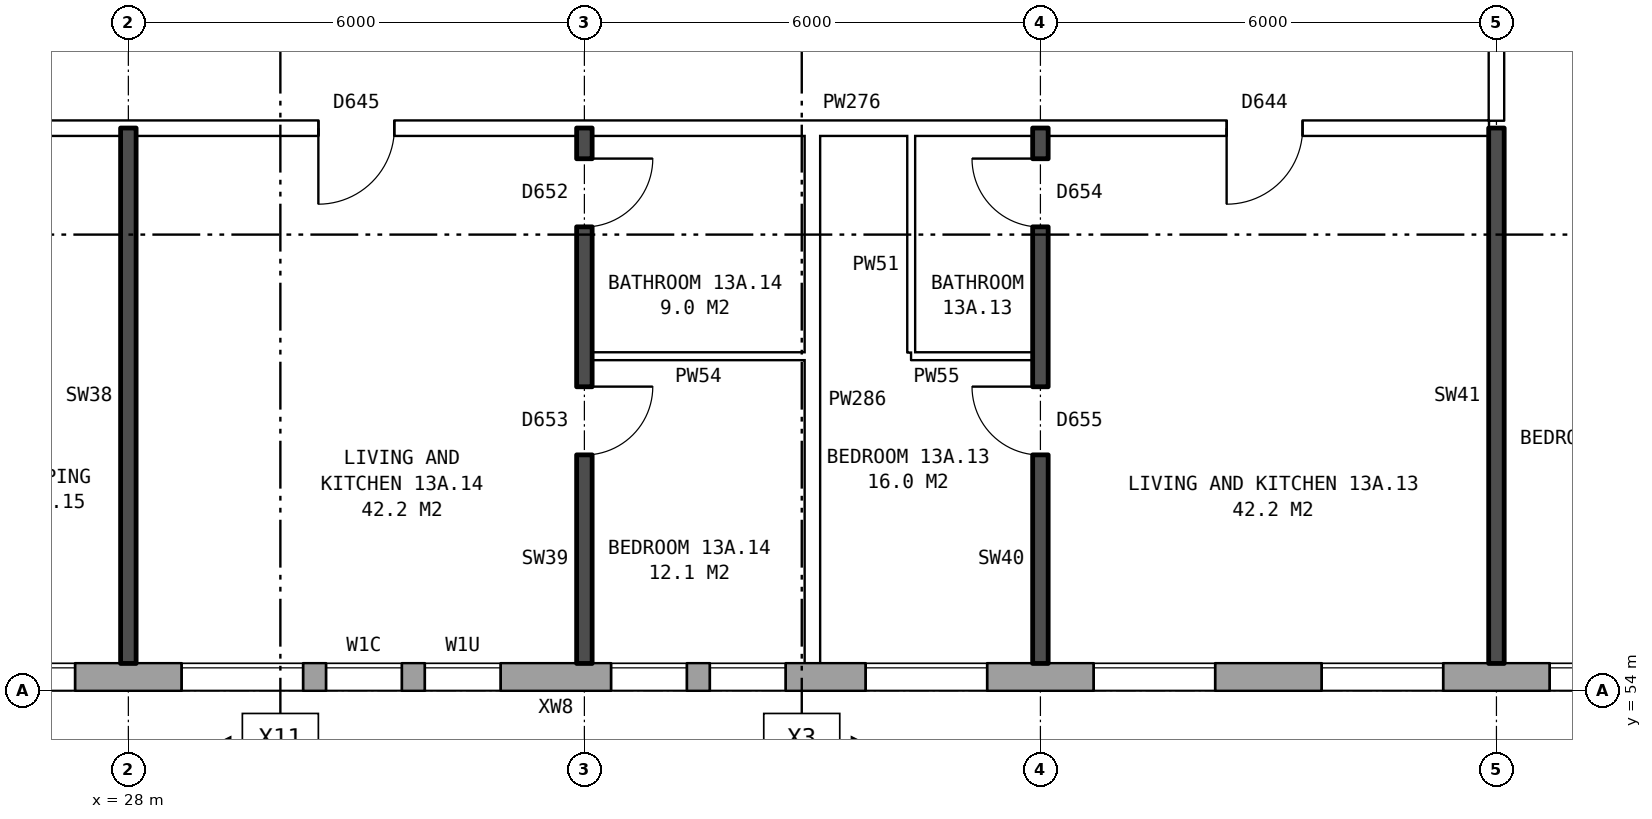
"""IFC4 building model, lengths in metres.
Left out: names, types, materials, properties, quantities, classifications, styles, units other than length and angle.
Written with IfcOpenShell. Run it as: python <this file> out.ifc"""

import sys

from ifc_helpers import new_model, si_unit, direction, frame, frame_2d, origin, place, context, subcontext, project, spatial, rectangle, extrude, element, fill, save


model = new_model("IFC4")
c1 = context("Model", 3, precision=1e-05, world=origin(), true_north=direction((0.0, 1.0)))
c2 = subcontext(c1, "Body", "Model", "MODEL_VIEW")
j1 = project(units=[si_unit("LENGTHUNIT", "METRE"), si_unit("PLANEANGLEUNIT", "RADIAN")], contexts=[c1])
p1 = place(None, origin())
s1 = spatial("IfcSite", under=j1, at=p1, CompositionType="ELEMENT")
p2 = place(p1, origin())
s2 = spatial("IfcBuilding", under=s1, at=p2, CompositionType="ELEMENT")
p3 = place(p2, frame((0.0, 0.0, 50.5)))
s3 = spatial("IfcBuildingStorey", under=s2, at=p3, CompositionType="ELEMENT", Elevation=50.5)
p4 = place(p3, frame((24.575, 54.18, 0.0), z_axis=(0.0, 0.0, 1.0), x_axis=(1.0, 0.0, 0.0)))
e1 = element("IfcWall", 1, at=p4, inside=s3, PredefinedType="STANDARD", context=c2, shape_type="SweptSolid", body=[
    extrude(rectangle(XDim=48.351, YDim=0.36, at=frame_2d((24.175, 0.0))), origin(), (0.0, 0.0, 1.0), 2.85),
])
p5 = place(p4, frame((1.125, 0.0, 0.8)))
e2 = element("IfcOpeningElement", 2, at=p5, cuts=e1, PredefinedType="OPENING", context=c2, shape_type="SweptSolid", body=[
    extrude(rectangle(XDim=1.6, YDim=1.8, at=frame_2d((0.8, 0.9))), frame((0.0, 0.19, 0.0), z_axis=(0.0, -1.0, 0.0), x_axis=(1.0, 0.0, 0.0)), (0.0, 0.0, 1.0), 0.38),
])
p6 = place(p4, frame((4.125, 0.0, 0.8)))
e3 = element("IfcOpeningElement", 3, at=p6, cuts=e1, PredefinedType="OPENING", context=c2, shape_type="SweptSolid", body=[
    extrude(rectangle(XDim=1.6, YDim=1.8, at=frame_2d((0.8, 0.9))), frame((0.0, 0.19, 0.0), z_axis=(0.0, -1.0, 0.0), x_axis=(1.0, 0.0, 0.0)), (0.0, 0.0, 1.0), 0.38),
])
p7 = place(p4, frame((6.025, 0.0, 0.8)))
e4 = element("IfcOpeningElement", 4, at=p7, cuts=e1, PredefinedType="OPENING", context=c2, shape_type="SweptSolid", body=[
    extrude(rectangle(XDim=1.0, YDim=1.8, at=frame_2d((0.5, 0.9))), frame((0.0, 0.19, 0.0), z_axis=(0.0, -1.0, 0.0), x_axis=(1.0, 0.0, 0.0)), (0.0, 0.0, 1.0), 0.38),
])
p8 = place(p4, frame((9.775, 0.0, 0.8)))
e5 = element("IfcOpeningElement", 5, at=p8, cuts=e1, PredefinedType="OPENING", context=c2, shape_type="SweptSolid", body=[
    extrude(rectangle(XDim=1.0, YDim=0.9, at=frame_2d((0.5, 0.45))), frame((0.0, 0.19, 0.0), z_axis=(0.0, -1.0, 0.0), x_axis=(1.0, 0.0, 0.0)), (0.0, 0.0, 1.0), 0.38),
])
p9 = place(p4, frame((13.125, 0.0, 0.8)))
e6 = element("IfcOpeningElement", 6, at=p9, cuts=e1, PredefinedType="OPENING", context=c2, shape_type="SweptSolid", body=[
    extrude(rectangle(XDim=1.6, YDim=1.8, at=frame_2d((0.8, 0.9))), frame((0.0, 0.19, 0.0), z_axis=(0.0, -1.0, 0.0), x_axis=(1.0, 0.0, 0.0)), (0.0, 0.0, 1.0), 0.38),
])
p10 = place(p4, frame((16.125, 0.0, 0.8)))
e7 = element("IfcOpeningElement", 7, at=p10, cuts=e1, PredefinedType="OPENING", context=c2, shape_type="SweptSolid", body=[
    extrude(rectangle(XDim=1.6, YDim=1.8, at=frame_2d((0.8, 0.9))), frame((0.0, 0.19, 0.0), z_axis=(0.0, -1.0, 0.0), x_axis=(1.0, 0.0, 0.0)), (0.0, 0.0, 1.0), 0.38),
])
p11 = place(p4, frame((19.125, 0.0, 0.8)))
e8 = element("IfcOpeningElement", 8, at=p11, cuts=e1, PredefinedType="OPENING", context=c2, shape_type="SweptSolid", body=[
    extrude(rectangle(XDim=1.6, YDim=1.8, at=frame_2d((0.8, 0.9))), frame((0.0, 0.19, 0.0), z_axis=(0.0, -1.0, 0.0), x_axis=(1.0, 0.0, 0.0)), (0.0, 0.0, 1.0), 0.38),
])
p12 = place(p4, frame((22.125, 0.0, 0.8)))
e9 = element("IfcOpeningElement", 9, at=p12, cuts=e1, PredefinedType="OPENING", context=c2, shape_type="SweptSolid", body=[
    extrude(rectangle(XDim=1.6, YDim=1.8, at=frame_2d((0.8, 0.9))), frame((0.0, 0.19, 0.0), z_axis=(0.0, -1.0, 0.0), x_axis=(1.0, 0.0, 0.0)), (0.0, 0.0, 1.0), 0.38),
])
p13 = place(p4, frame((25.125, 0.0, 0.8)))
e10 = element("IfcOpeningElement", 10, at=p13, cuts=e1, PredefinedType="OPENING", context=c2, shape_type="SweptSolid", body=[
    extrude(rectangle(XDim=1.6, YDim=1.8, at=frame_2d((0.8, 0.9))), frame((0.0, 0.19, 0.0), z_axis=(0.0, -1.0, 0.0), x_axis=(1.0, 0.0, 0.0)), (0.0, 0.0, 1.0), 0.38),
])
p14 = place(p4, frame((28.125, 0.0, 0.8)))
e11 = element("IfcOpeningElement", 11, at=p14, cuts=e1, PredefinedType="OPENING", context=c2, shape_type="SweptSolid", body=[
    extrude(rectangle(XDim=1.6, YDim=1.8, at=frame_2d((0.8, 0.9))), frame((0.0, 0.19, 0.0), z_axis=(0.0, -1.0, 0.0), x_axis=(1.0, 0.0, 0.0)), (0.0, 0.0, 1.0), 0.38),
])
p15 = place(p4, frame((31.125, 0.0, 0.8)))
e12 = element("IfcOpeningElement", 12, at=p15, cuts=e1, PredefinedType="OPENING", context=c2, shape_type="SweptSolid", body=[
    extrude(rectangle(XDim=1.6, YDim=1.8, at=frame_2d((0.8, 0.9))), frame((0.0, 0.19, 0.0), z_axis=(0.0, -1.0, 0.0), x_axis=(1.0, 0.0, 0.0)), (0.0, 0.0, 1.0), 0.38),
])
p16 = place(p4, frame((34.125, 0.0, 0.8)))
e13 = element("IfcOpeningElement", 13, at=p16, cuts=e1, PredefinedType="OPENING", context=c2, shape_type="SweptSolid", body=[
    extrude(rectangle(XDim=1.6, YDim=1.8, at=frame_2d((0.8, 0.9))), frame((0.0, 0.19, 0.0), z_axis=(0.0, -1.0, 0.0), x_axis=(1.0, 0.0, 0.0)), (0.0, 0.0, 1.0), 0.38),
])
p17 = place(p4, frame((36.575, 0.0, 0.45)))
e14 = element("IfcOpeningElement", 14, at=p17, cuts=e1, PredefinedType="OPENING", context=c2, shape_type="SweptSolid", body=[
    extrude(rectangle(XDim=1.2, YDim=1.8, at=frame_2d((0.6, 0.9))), frame((0.0, 0.19, 0.0), z_axis=(0.0, -1.0, 0.0), x_axis=(1.0, 0.0, 0.0)), (0.0, 0.0, 1.0), 0.38),
])
p18 = place(p4, frame((39.975, 0.0, 1.7)))
e15 = element("IfcOpeningElement", 15, at=p18, cuts=e1, PredefinedType="OPENING", context=c2, shape_type="SweptSolid", body=[
    extrude(rectangle(XDim=1.0, YDim=0.9, at=frame_2d((0.5, 0.45))), frame((0.0, 0.19, 0.0), z_axis=(0.0, -1.0, 0.0), x_axis=(1.0, 0.0, 0.0)), (0.0, 0.0, 1.0), 0.38),
])
p19 = place(p4, frame((43.125, 0.0, 0.8)))
e16 = element("IfcOpeningElement", 16, at=p19, cuts=e1, PredefinedType="OPENING", context=c2, shape_type="SweptSolid", body=[
    extrude(rectangle(XDim=1.6, YDim=1.8, at=frame_2d((0.8, 0.9))), frame((0.0, 0.19, 0.0), z_axis=(0.0, -1.0, 0.0), x_axis=(1.0, 0.0, 0.0)), (0.0, 0.0, 1.0), 0.38),
])
p20 = place(p4, frame((46.125, 0.0, 0.8)))
e17 = element("IfcOpeningElement", 17, at=p20, cuts=e1, PredefinedType="OPENING", context=c2, shape_type="SweptSolid", body=[
    extrude(rectangle(XDim=1.6, YDim=1.8, at=frame_2d((0.8, 0.9))), frame((0.0, 0.19, 0.0), z_axis=(0.0, -1.0, 0.0), x_axis=(1.0, 0.0, 0.0)), (0.0, 0.0, 1.0), 0.38),
])
p21 = place(p4, frame((7.325, 0.0, 1.7)))
e18 = element("IfcOpeningElement", 18, at=p21, cuts=e1, PredefinedType="OPENING", context=c2, shape_type="SweptSolid", body=[
    extrude(rectangle(XDim=1.0, YDim=0.9, at=frame_2d((0.5, 0.45))), frame((0.0, 0.19, 0.0), z_axis=(0.0, -1.0, 0.0), x_axis=(1.0, 0.0, 0.0)), (0.0, 0.0, 1.0), 0.38),
])
p22 = place(p4, frame((11.075, 0.0, 0.8)))
e19 = element("IfcOpeningElement", 19, at=p22, cuts=e1, PredefinedType="OPENING", context=c2, shape_type="SweptSolid", body=[
    extrude(rectangle(XDim=1.0, YDim=1.8, at=frame_2d((0.5, 0.9))), frame((0.0, 0.19, 0.0), z_axis=(0.0, -1.0, 0.0), x_axis=(1.0, 0.0, 0.0)), (0.0, 0.0, 1.0), 0.38),
])
p23 = place(p4, frame((38.075, 0.0, 0.45)))
e20 = element("IfcOpeningElement", 20, at=p23, cuts=e1, PredefinedType="OPENING", context=c2, shape_type="SweptSolid", body=[
    extrude(rectangle(XDim=1.0, YDim=0.9, at=frame_2d((0.5, 0.45))), frame((0.0, 0.19, 0.0), z_axis=(0.0, -1.0, 0.0), x_axis=(1.0, 0.0, 0.0)), (0.0, 0.0, 1.0), 0.38),
])
p24 = place(p4, frame((41.275, 0.0, 0.8)))
e21 = element("IfcOpeningElement", 21, at=p24, cuts=e1, PredefinedType="OPENING", context=c2, shape_type="SweptSolid", body=[
    extrude(rectangle(XDim=1.4, YDim=1.8, at=frame_2d((0.7, 0.9))), frame((0.0, 0.19, 0.0), z_axis=(0.0, -1.0, 0.0), x_axis=(1.0, 0.0, 0.0)), (0.0, 0.0, 1.0), 0.38),
])
p25 = place(p3, frame((34.1, 58.4, 0.0), z_axis=(0.0, 0.0, 1.0), x_axis=(1.0, 0.0, 0.0)))
e22 = element("IfcWall", 22, at=p25, inside=s3, PredefinedType="PARTITIONING", context=c2, shape_type="SweptSolid", body=[
    extrude(rectangle(XDim=2.8, YDim=0.1, at=frame_2d((1.4, 0.0))), origin(), (0.0, 0.0, 1.0), 2.85),
])
p26 = place(p3, frame((38.3, 58.4, 0.0), z_axis=(0.0, 0.0, 1.0), x_axis=(1.0, 0.0, 0.0)))
e23 = element("IfcWall", 23, at=p26, inside=s3, PredefinedType="PARTITIONING", context=c2, shape_type="SweptSolid", body=[
    extrude(rectangle(XDim=1.6, YDim=0.1, at=frame_2d((0.8, 0.0))), origin(), (0.0, 0.0, 1.0), 2.85),
])
p27 = place(p3, frame((21.86, 61.4, 0.0), z_axis=(0.0, 0.0, 1.0), x_axis=(1.0, 0.0, 0.0)))
e24 = element("IfcWall", 24, at=p27, inside=s3, PredefinedType="PARTITIONING", context=c2, shape_type="SweptSolid", body=[
    extrude(rectangle(XDim=24.04, YDim=0.2, at=frame_2d((12.02, 0.0))), origin(), (0.0, 0.0, 1.0), 2.85),
])
p28 = place(p27, frame((20.59, 0.0, 0.0)))
e25 = element("IfcOpeningElement", 25, at=p28, cuts=e24, PredefinedType="OPENING", context=c2, shape_type="SweptSolid", body=[
    extrude(rectangle(XDim=1.0, YDim=2.1, at=frame_2d((0.5, 1.05))), frame((0.0, 0.11, 0.0), z_axis=(0.0, -1.0, 0.0), x_axis=(1.0, 0.0, 0.0)), (0.0, 0.0, 1.0), 0.22),
])
p29 = place(p27, frame((8.64, 0.0, 0.0)))
e26 = element("IfcOpeningElement", 26, at=p29, cuts=e24, PredefinedType="OPENING", context=c2, shape_type="SweptSolid", body=[
    extrude(rectangle(XDim=1.0, YDim=2.1, at=frame_2d((0.5, 1.05))), frame((0.0, 0.11, 0.0), z_axis=(0.0, -1.0, 0.0), x_axis=(1.0, 0.0, 0.0)), (0.0, 0.0, 1.0), 0.22),
])
p30 = place(p27, frame((3.64, 0.0, 0.0)))
e27 = element("IfcOpeningElement", 27, at=p30, cuts=e24, PredefinedType="OPENING", context=c2, shape_type="SweptSolid", body=[
    extrude(rectangle(XDim=1.0, YDim=2.1, at=frame_2d((0.5, 1.05))), frame((0.0, 0.11, 0.0), z_axis=(0.0, -1.0, 0.0), x_axis=(1.0, 0.0, 0.0)), (0.0, 0.0, 1.0), 0.22),
])
p31 = place(p3, frame((28.0, 54.36, 0.0), z_axis=(0.0, 0.0, 1.0), x_axis=(0.0, 1.0, 0.0)))
e28 = element("IfcWall", 28, at=p31, inside=s3, PredefinedType="SOLIDWALL", context=c2, shape_type="SweptSolid", body=[
    extrude(rectangle(XDim=7.04, YDim=0.2, at=frame_2d((3.52, 0.0))), origin(), (0.0, 0.0, 1.0), 2.85),
])
p32 = place(p3, frame((34.0, 54.36, 0.0), z_axis=(0.0, 0.0, 1.0), x_axis=(0.0, 1.0, 0.0)))
e29 = element("IfcWall", 29, at=p32, inside=s3, PredefinedType="SOLIDWALL", context=c2, shape_type="SweptSolid", body=[
    extrude(rectangle(XDim=7.04, YDim=0.2, at=frame_2d((3.52, 0.0))), origin(), (0.0, 0.0, 1.0), 2.85),
])
p33 = place(p32, frame((2.74, 0.0, 0.0)))
e30 = element("IfcOpeningElement", 30, at=p33, cuts=e29, PredefinedType="OPENING", context=c2, shape_type="SweptSolid", body=[
    extrude(rectangle(XDim=0.9, YDim=2.1, at=frame_2d((0.45, 1.05))), frame((0.0, 0.11, 0.0), z_axis=(0.0, -1.0, 0.0), x_axis=(1.0, 0.0, 0.0)), (0.0, 0.0, 1.0), 0.22),
])
p34 = place(p32, frame((5.74, 0.0, 0.0)))
e31 = element("IfcOpeningElement", 31, at=p34, cuts=e29, PredefinedType="OPENING", context=c2, shape_type="SweptSolid", body=[
    extrude(rectangle(XDim=0.9, YDim=2.1, at=frame_2d((0.45, 1.05))), frame((0.0, 0.11, 0.0), z_axis=(0.0, -1.0, 0.0), x_axis=(1.0, 0.0, 0.0)), (0.0, 0.0, 1.0), 0.22),
])
p35 = place(p3, frame((37.0, 54.36, 0.0), z_axis=(0.0, 0.0, 1.0), x_axis=(0.0, 1.0, 0.0)))
e32 = element("IfcWall", 32, at=p35, inside=s3, PredefinedType="PARTITIONING", context=c2, shape_type="SweptSolid", body=[
    extrude(rectangle(XDim=6.94, YDim=0.2, at=frame_2d((3.47, 0.0))), origin(), (0.0, 0.0, 1.0), 2.85),
])
p36 = place(p3, frame((38.3, 58.45, 0.0), z_axis=(0.0, 0.0, 1.0), x_axis=(0.0, 1.0, 0.0)))
e33 = element("IfcWall", 33, at=p36, inside=s3, PredefinedType="PARTITIONING", context=c2, shape_type="SweptSolid", body=[
    extrude(rectangle(XDim=2.85, YDim=0.1, at=frame_2d((1.425, 0.0))), origin(), (0.0, 0.0, 1.0), 2.85),
])
p37 = place(p3, frame((40.0, 54.36, 0.0), z_axis=(0.0, 0.0, 1.0), x_axis=(0.0, 1.0, 0.0)))
e34 = element("IfcWall", 34, at=p37, inside=s3, PredefinedType="SOLIDWALL", context=c2, shape_type="SweptSolid", body=[
    extrude(rectangle(XDim=7.04, YDim=0.2, at=frame_2d((3.52, 0.0))), origin(), (0.0, 0.0, 1.0), 2.85),
])
p38 = place(p37, frame((2.74, 0.0, 0.0)))
e35 = element("IfcOpeningElement", 35, at=p38, cuts=e34, PredefinedType="OPENING", context=c2, shape_type="SweptSolid", body=[
    extrude(rectangle(XDim=0.9, YDim=2.1, at=frame_2d((0.45, 1.05))), frame((0.0, 0.11, 0.0), z_axis=(0.0, -1.0, 0.0), x_axis=(1.0, 0.0, 0.0)), (0.0, 0.0, 1.0), 0.22),
])
p39 = place(p37, frame((5.74, 0.0, 0.0)))
e36 = element("IfcOpeningElement", 36, at=p39, cuts=e34, PredefinedType="OPENING", context=c2, shape_type="SweptSolid", body=[
    extrude(rectangle(XDim=0.9, YDim=2.1, at=frame_2d((0.45, 1.05))), frame((0.0, 0.11, 0.0), z_axis=(0.0, -1.0, 0.0), x_axis=(1.0, 0.0, 0.0)), (0.0, 0.0, 1.0), 0.22),
])
p40 = place(p3, frame((46.0, 54.36, 0.0), z_axis=(0.0, 0.0, 1.0), x_axis=(0.0, 1.0, 0.0)))
e37 = element("IfcWall", 37, at=p40, inside=s3, PredefinedType="SOLIDWALL", context=c2, shape_type="SweptSolid", body=[
    extrude(rectangle(XDim=7.04, YDim=0.2, at=frame_2d((3.52, 0.0))), origin(), (0.0, 0.0, 1.0), 2.85),
])
p41 = place(p3, frame((46.0, 61.5, 0.0), z_axis=(0.0, 0.0, 1.0), x_axis=(0.0, 1.0, 0.0)))
e38 = element("IfcWall", 38, at=p41, inside=s3, PredefinedType="PARTITIONING", context=c2, shape_type="SweptSolid", body=[
    extrude(rectangle(XDim=2.2, YDim=0.2, at=frame_2d((1.1, 0.0))), origin(), (0.0, 0.0, 1.0), 2.85),
])
p42 = place(p5, origin())
e39 = element("IfcWindow", 39, at=p42, inside=s3, PartitioningType="SINGLE_PANEL", PredefinedType="WINDOW", context=c2, shape_type="SweptSolid", body=[
    extrude(rectangle(XDim=1.6, YDim=1.8, at=frame_2d((0.8, 0.9))), frame((0.0, 0.15, 0.0), z_axis=(0.0, -1.0, 0.0), x_axis=(1.0, 0.0, 0.0)), (0.0, 0.0, 1.0), 0.06),
])
fill(e2, e39)
p43 = place(p6, origin())
e40 = element("IfcWindow", 40, at=p43, inside=s3, PartitioningType="SINGLE_PANEL", PredefinedType="WINDOW", context=c2, shape_type="SweptSolid", body=[
    extrude(rectangle(XDim=1.6, YDim=1.8, at=frame_2d((0.8, 0.9))), frame((0.0, 0.15, 0.0), z_axis=(0.0, -1.0, 0.0), x_axis=(1.0, 0.0, 0.0)), (0.0, 0.0, 1.0), 0.06),
])
fill(e3, e40)
p44 = place(p7, origin())
e41 = element("IfcWindow", 41, at=p44, inside=s3, PartitioningType="SINGLE_PANEL", PredefinedType="WINDOW", context=c2, shape_type="SweptSolid", body=[
    extrude(rectangle(XDim=1.0, YDim=1.8, at=frame_2d((0.5, 0.9))), frame((0.0, 0.15, 0.0), z_axis=(0.0, -1.0, 0.0), x_axis=(1.0, 0.0, 0.0)), (0.0, 0.0, 1.0), 0.06),
])
fill(e4, e41)
p45 = place(p8, origin())
e42 = element("IfcWindow", 42, at=p45, inside=s3, PartitioningType="SINGLE_PANEL", PredefinedType="WINDOW", context=c2, shape_type="SweptSolid", body=[
    extrude(rectangle(XDim=1.0, YDim=0.9, at=frame_2d((0.5, 0.45))), frame((0.0, 0.15, 0.0), z_axis=(0.0, -1.0, 0.0), x_axis=(1.0, 0.0, 0.0)), (0.0, 0.0, 1.0), 0.06),
])
fill(e5, e42)
p46 = place(p9, origin())
e43 = element("IfcWindow", 43, at=p46, inside=s3, PartitioningType="SINGLE_PANEL", PredefinedType="WINDOW", context=c2, shape_type="SweptSolid", body=[
    extrude(rectangle(XDim=1.6, YDim=1.8, at=frame_2d((0.8, 0.9))), frame((0.0, 0.15, 0.0), z_axis=(0.0, -1.0, 0.0), x_axis=(1.0, 0.0, 0.0)), (0.0, 0.0, 1.0), 0.06),
])
fill(e6, e43)
p47 = place(p10, origin())
e44 = element("IfcWindow", 44, at=p47, inside=s3, PartitioningType="SINGLE_PANEL", PredefinedType="WINDOW", context=c2, shape_type="SweptSolid", body=[
    extrude(rectangle(XDim=1.6, YDim=1.8, at=frame_2d((0.8, 0.9))), frame((0.0, 0.15, 0.0), z_axis=(0.0, -1.0, 0.0), x_axis=(1.0, 0.0, 0.0)), (0.0, 0.0, 1.0), 0.06),
])
fill(e7, e44)
p48 = place(p11, origin())
e45 = element("IfcWindow", 45, at=p48, inside=s3, PartitioningType="SINGLE_PANEL", PredefinedType="WINDOW", context=c2, shape_type="SweptSolid", body=[
    extrude(rectangle(XDim=1.6, YDim=1.8, at=frame_2d((0.8, 0.9))), frame((0.0, 0.15, 0.0), z_axis=(0.0, -1.0, 0.0), x_axis=(1.0, 0.0, 0.0)), (0.0, 0.0, 1.0), 0.06),
])
fill(e8, e45)
p49 = place(p12, origin())
e46 = element("IfcWindow", 46, at=p49, inside=s3, PartitioningType="SINGLE_PANEL", PredefinedType="WINDOW", context=c2, shape_type="SweptSolid", body=[
    extrude(rectangle(XDim=1.6, YDim=1.8, at=frame_2d((0.8, 0.9))), frame((0.0, 0.15, 0.0), z_axis=(0.0, -1.0, 0.0), x_axis=(1.0, 0.0, 0.0)), (0.0, 0.0, 1.0), 0.06),
])
fill(e9, e46)
p50 = place(p38, origin())
e47 = element("IfcDoor", 47, at=p50, inside=s3, OperationType="SINGLE_SWING_RIGHT", PredefinedType="DOOR", context=c2, shape_type="SweptSolid", body=[
    extrude(rectangle(XDim=0.9, YDim=2.1, at=frame_2d((0.45, 1.05))), frame((0.0, 0.025, 0.0), z_axis=(0.0, -1.0, 0.0), x_axis=(1.0, 0.0, 0.0)), (0.0, 0.0, 1.0), 0.05),
])
fill(e35, e47)
p51 = place(p28, frame((1.0, 0.0, 0.0), z_axis=(0.0, 0.0, 1.0), x_axis=(-1.0, 0.0, 0.0)))
e48 = element("IfcDoor", 48, at=p51, inside=s3, OperationType="SINGLE_SWING_RIGHT", PredefinedType="DOOR", context=c2, shape_type="SweptSolid", body=[
    extrude(rectangle(XDim=1.0, YDim=2.1, at=frame_2d((0.5, 1.05))), frame((0.0, 0.025, 0.0), z_axis=(0.0, -1.0, 0.0), x_axis=(1.0, 0.0, 0.0)), (0.0, 0.0, 1.0), 0.05),
])
fill(e25, e48)
p52 = place(p39, origin())
e49 = element("IfcDoor", 49, at=p52, inside=s3, OperationType="SINGLE_SWING_RIGHT", PredefinedType="DOOR", context=c2, shape_type="SweptSolid", body=[
    extrude(rectangle(XDim=0.9, YDim=2.1, at=frame_2d((0.45, 1.05))), frame((0.0, 0.025, 0.0), z_axis=(0.0, -1.0, 0.0), x_axis=(1.0, 0.0, 0.0)), (0.0, 0.0, 1.0), 0.05),
])
fill(e36, e49)
p53 = place(p33, frame((0.9, 0.0, 0.0), z_axis=(0.0, 0.0, 1.0), x_axis=(-1.0, 0.0, 0.0)))
e50 = element("IfcDoor", 50, at=p53, inside=s3, OperationType="SINGLE_SWING_LEFT", PredefinedType="DOOR", context=c2, shape_type="SweptSolid", body=[
    extrude(rectangle(XDim=0.9, YDim=2.1, at=frame_2d((0.45, 1.05))), frame((0.0, 0.025, 0.0), z_axis=(0.0, -1.0, 0.0), x_axis=(1.0, 0.0, 0.0)), (0.0, 0.0, 1.0), 0.05),
])
fill(e30, e50)
p54 = place(p29, frame((1.0, 0.0, 0.0), z_axis=(0.0, 0.0, 1.0), x_axis=(-1.0, 0.0, 0.0)))
e51 = element("IfcDoor", 51, at=p54, inside=s3, OperationType="SINGLE_SWING_RIGHT", PredefinedType="DOOR", context=c2, shape_type="SweptSolid", body=[
    extrude(rectangle(XDim=1.0, YDim=2.1, at=frame_2d((0.5, 1.05))), frame((0.0, 0.025, 0.0), z_axis=(0.0, -1.0, 0.0), x_axis=(1.0, 0.0, 0.0)), (0.0, 0.0, 1.0), 0.05),
])
fill(e26, e51)
p55 = place(p34, frame((0.9, 0.0, 0.0), z_axis=(0.0, 0.0, 1.0), x_axis=(-1.0, 0.0, 0.0)))
e52 = element("IfcDoor", 52, at=p55, inside=s3, OperationType="SINGLE_SWING_LEFT", PredefinedType="DOOR", context=c2, shape_type="SweptSolid", body=[
    extrude(rectangle(XDim=0.9, YDim=2.1, at=frame_2d((0.45, 1.05))), frame((0.0, 0.025, 0.0), z_axis=(0.0, -1.0, 0.0), x_axis=(1.0, 0.0, 0.0)), (0.0, 0.0, 1.0), 0.05),
])
fill(e31, e52)
p56 = place(p21, origin())
e53 = element("IfcWindow", 53, at=p56, inside=s3, PartitioningType="SINGLE_PANEL", PredefinedType="WINDOW", context=c2, shape_type="SweptSolid", body=[
    extrude(rectangle(XDim=1.0, YDim=0.9, at=frame_2d((0.5, 0.45))), frame((0.0, 0.15, 0.0), z_axis=(0.0, -1.0, 0.0), x_axis=(1.0, 0.0, 0.0)), (0.0, 0.0, 1.0), 0.06),
])
fill(e18, e53)
p57 = place(p22, origin())
e54 = element("IfcWindow", 54, at=p57, inside=s3, PartitioningType="SINGLE_PANEL", PredefinedType="WINDOW", context=c2, shape_type="SweptSolid", body=[
    extrude(rectangle(XDim=1.0, YDim=1.8, at=frame_2d((0.5, 0.9))), frame((0.0, 0.15, 0.0), z_axis=(0.0, -1.0, 0.0), x_axis=(1.0, 0.0, 0.0)), (0.0, 0.0, 1.0), 0.06),
])
fill(e19, e54)
save(model, sys.argv[1])
